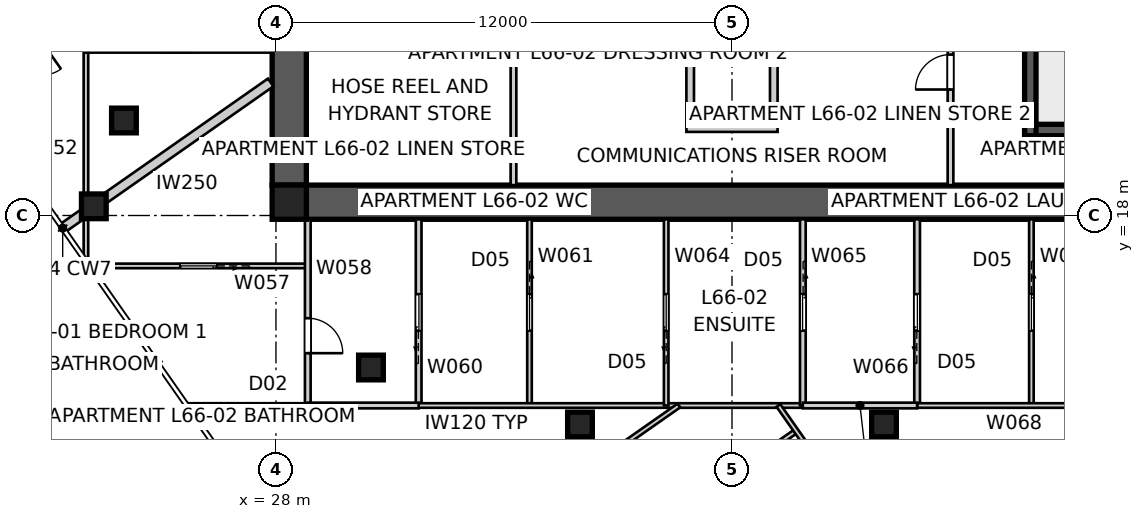
"""IFC4 building model, lengths in metres.
Left out: names, types, materials, properties, quantities, classifications, styles, units other than length and angle.
Written with IfcOpenShell. Run it as: python <this file> out.ifc"""

import sys

from ifc_helpers import new_model, si_unit, direction, frame, frame_2d, origin, origin_2d, place, context, subcontext, project, spatial, polyline, rectangle, outline, extrude, element, fill, save


model = new_model("IFC4")
c1 = context("Model", 3, precision=1e-05, world=origin(), true_north=direction((0.0, 1.0)))
c2 = subcontext(c1, "Body", "Model", "MODEL_VIEW")
j1 = project(units=[si_unit("LENGTHUNIT", "METRE"), si_unit("PLANEANGLEUNIT", "RADIAN")], contexts=[c1])
p1 = place(None, origin())
s1 = spatial("IfcSite", under=j1, at=p1, CompositionType="ELEMENT")
p2 = place(p1, origin())
s2 = spatial("IfcBuilding", under=s1, at=p2, CompositionType="ELEMENT")
p3 = place(p2, frame((0.0, 0.0, 240.4)))
s3 = spatial("IfcBuildingStorey", under=s2, at=p3, CompositionType="ELEMENT", Elevation=240.4)
p4 = place(p3, frame((51.2, 18.35, 0.0), z_axis=(0.0, 0.0, 1.0), x_axis=(-1.0, 0.0, 0.0)))
e1 = element("IfcWall", 1, at=p4, inside=s3, PredefinedType="SHEAR", context=c2, shape_type="SweptSolid", body=[
    extrude(outline(polyline([(0.0, -0.45), (22.4, -0.45), (22.4, -0.025), (22.85, -0.025), (22.85, 0.025), (22.4, 0.025), (22.4, 0.45), (0.0, 0.45), (0.0, 0.025), (-0.45, 0.025), (-0.45, -0.025), (0.0, -0.025), (0.0, -0.45)])), origin(), (0.0, 0.0, 1.0), 3.4),
])
p5 = place(p3, frame((28.35, 41.2, 0.0), z_axis=(0.0, 0.0, 1.0), x_axis=(0.0, -1.0, 0.0)))
e2 = element("IfcWall", 2, at=p5, inside=s3, PredefinedType="SHEAR", context=c2, shape_type="SweptSolid", body=[
    extrude(outline(polyline([(0.0, -0.45), (22.4, -0.45), (22.4, -0.025), (22.85, -0.025), (22.85, 0.025), (22.4, 0.025), (22.4, 0.45), (0.0, 0.45), (0.0, 0.025), (-0.45, 0.025), (-0.45, -0.025), (0.0, -0.025), (0.0, -0.45)])), origin(), (0.0, 0.0, 1.0), 3.4),
])
p6 = place(p5, frame((11.14, 0.0, 0.0)))
e3 = element("IfcOpeningElement", 3, at=p6, cuts=e2, PredefinedType="OPENING", context=c2, shape_type="SweptSolid", body=[
    extrude(rectangle(XDim=1.02, YDim=2.4, at=frame_2d((0.51, 1.2))), frame((0.0, 0.46, 0.0), z_axis=(0.0, -1.0, 0.0), x_axis=(1.0, 0.0, 0.0)), (0.0, 0.0, 1.0), 0.92),
])
p7 = place(p3, frame((47.85, 27.8, 0.0), z_axis=(0.0, 0.0, 1.0), x_axis=(0.0, -1.0, 0.0)))
e4 = element("IfcWall", 4, at=p7, inside=s3, PredefinedType="SHEAR", context=c2, shape_type="SweptSolid", body=[
    extrude(rectangle(XDim=7.7, YDim=0.3, at=frame_2d((3.85, 0.0))), origin(), (0.0, 0.0, 1.0), 3.4),
])
p8 = place(p3, frame((51.2, 20.25, 0.0), z_axis=(0.0, 0.0, 1.0), x_axis=(-1.0, 0.0, 0.0)))
e5 = element("IfcWall", 5, at=p8, inside=s3, PredefinedType="SHEAR", context=c2, shape_type="SweptSolid", body=[
    extrude(rectangle(XDim=3.5, YDim=0.3, at=frame_2d((1.75, 0.0))), origin(), (0.0, 0.0, 1.0), 3.4),
])
for number, where, z_axis, x_axis in (
    (6, (38.9, 22.4, 0.0), (0.0, 0.0, 1.0), (0.0, -1.0, 0.0)),
    (7, (41.1, 22.4, 0.0), (0.0, 0.0, 1.0), (0.0, -1.0, 0.0)),
):
    element("IfcWall", number, at=place(p3, frame(where, z_axis=z_axis, x_axis=x_axis)), inside=s3, PredefinedType="SOLIDWALL", context=c2, shape_type="SweptSolid", body=[
        extrude(rectangle(XDim=2.0, YDim=0.2, at=frame_2d((1.0, 0.0))), origin(), (0.0, 0.0, 1.0), 3.4),
    ])
p9 = place(p3, frame((38.8, 20.3, 0.0), z_axis=(0.0, 0.0, 1.0), x_axis=(1.0, 0.0, 0.0)))
e8 = element("IfcWall", 8, at=p9, inside=s3, PredefinedType="SOLIDWALL", context=c2, shape_type="SweptSolid", body=[
    extrude(rectangle(XDim=2.4, YDim=0.2, at=frame_2d((1.2, 0.0))), origin(), (0.0, 0.0, 1.0), 3.4),
])
p10 = place(p3, frame((28.35, 18.35, 0.0), z_axis=(0.0, 0.0, 1.0), x_axis=(1.0, 0.0, 0.0)))
e9 = element("IfcColumn", 9, at=p10, inside=s3, PredefinedType="COLUMN", context=c2, shape_type="SweptSolid", body=[
    extrude(rectangle(XDim=0.9, YDim=0.9, at=origin_2d()), origin(), (0.0, 0.0, 1.0), 3.4),
])
p11 = place(p3, frame((23.207, 18.242, -0.15), z_axis=(0.0, 0.0, 1.0), x_axis=(1.0, 0.0, 0.0)))
e10 = element("IfcColumn", 10, at=p11, inside=s3, PredefinedType="COLUMN", context=c2, shape_type="SweptSolid", body=[
    extrude(rectangle(XDim=0.65, YDim=0.65, at=origin_2d()), origin(), (0.0, 0.0, 1.0), 3.55),
])
for number, where, z_axis, x_axis in (
    (11, (24.0, 20.5, 0.0), (0.0, 0.0, 1.0), (1.0, 0.0, 0.0)),
    (12, (30.5, 14.0, 0.0), (0.0, 0.0, 1.0), (1.0, 0.0, 0.0)),
    (13, (36.0, 12.5, 0.0), (0.0, 0.0, 1.0), (1.0, 0.0, 0.0)),
    (14, (44.0, 12.5, 0.0), (0.0, 0.0, 1.0), (1.0, 0.0, 0.0)),
):
    element("IfcColumn", number, at=place(p3, frame(where, z_axis=z_axis, x_axis=x_axis)), inside=s3, PredefinedType="COLUMN", context=c2, shape_type="SweptSolid", body=[
        extrude(rectangle(XDim=0.65, YDim=0.65, at=origin_2d()), origin(), (0.0, 0.0, 1.0), 3.4),
    ])
p12 = place(p3, frame((22.388, 17.668, 0.0), z_axis=(0.0, 0.0, 1.0), x_axis=(0.819161528122, 0.573562891796, 0.0)))
e15 = element("IfcWall", 15, at=p12, inside=s3, PredefinedType="PARTITIONING", context=c2, shape_type="SweptSolid", body=[
    extrude(rectangle(XDim=6.681, YDim=0.25, at=frame_2d((3.341, 0.0))), origin(), (0.0, 0.0, 1.0), 3.25),
])
p13 = place(p3, frame((45.75, 18.8, 0.0), z_axis=(0.0, 0.0, 1.0), x_axis=(0.0, 1.0, 0.0)))
e16 = element("IfcWall", 16, at=p13, inside=s3, PredefinedType="SOLIDWALL", context=c2, shape_type="SweptSolid", body=[
    extrude(rectangle(XDim=5.95, YDim=0.15, at=frame_2d((2.975, 0.0))), origin(), (0.0, 0.0, 1.0), 3.25),
])
p14 = place(p13, frame((2.515, 0.0, 0.0)))
e17 = element("IfcOpeningElement", 17, at=p14, cuts=e16, PredefinedType="OPENING", context=c2, shape_type="SweptSolid", body=[
    extrude(rectangle(XDim=0.92, YDim=2.1, at=frame_2d((0.46, 1.05))), frame((0.0, 0.085, 0.0), z_axis=(0.0, -1.0, 0.0), x_axis=(1.0, 0.0, 0.0)), (0.0, 0.0, 1.0), 0.17),
])
p15 = place(p3, frame((34.25, 18.8, 0.0), z_axis=(0.0, 0.0, 1.0), x_axis=(0.0, 1.0, 0.0)))
e18 = element("IfcWall", 18, at=p15, inside=s3, PredefinedType="SOLIDWALL", context=c2, shape_type="SweptSolid", body=[
    extrude(rectangle(XDim=5.9, YDim=0.15, at=frame_2d((2.95, 0.0))), origin(), (0.0, 0.0, 1.0), 3.25),
])
p16 = place(p3, frame((23.0, 16.864, 0.0), z_axis=(0.0, 0.0, 1.0), x_axis=(0.0, 1.0, 0.0)))
e19 = element("IfcWall", 19, at=p16, inside=s3, PredefinedType="PARTITIONING", context=c2, shape_type="SweptSolid", body=[
    extrude(rectangle(XDim=19.28, YDim=0.12, at=frame_2d((9.64, 0.0))), origin(), (0.0, 0.0, 1.0), 2.55),
])
p17 = place(p16, frame((9.599, 0.0, 0.0)))
e20 = element("IfcOpeningElement", 20, at=p17, cuts=e19, PredefinedType="OPENING", context=c2, shape_type="SweptSolid", body=[
    extrude(rectangle(XDim=0.92, YDim=2.34, at=frame_2d((0.46, 1.17))), frame((0.0, 0.07, 0.0), z_axis=(0.0, -1.0, 0.0), x_axis=(1.0, 0.0, 0.0)), (0.0, 0.0, 1.0), 0.14),
])
p18 = place(p16, frame((17.603, 0.0, 0.0)))
e21 = element("IfcOpeningElement", 21, at=p18, cuts=e19, PredefinedType="OPENING", context=c2, shape_type="SweptSolid", body=[
    extrude(rectangle(XDim=0.92, YDim=2.34, at=frame_2d((0.46, 1.17))), frame((0.0, 0.07, 0.0), z_axis=(0.0, -1.0, 0.0), x_axis=(1.0, 0.0, 0.0)), (0.0, 0.0, 1.0), 0.14),
])
p19 = place(p16, frame((12.806, 0.0, 0.0)))
e22 = element("IfcOpeningElement", 22, at=p19, cuts=e19, PredefinedType="OPENING", context=c2, shape_type="SweptSolid", body=[
    extrude(rectangle(XDim=0.92, YDim=2.34, at=frame_2d((0.46, 1.17))), frame((0.0, 0.07, 0.0), z_axis=(0.0, -1.0, 0.0), x_axis=(1.0, 0.0, 0.0)), (0.0, 0.0, 1.0), 0.14),
])
p20 = place(p3, frame((23.0, 22.347, 0.0), z_axis=(0.0, 0.0, 1.0), x_axis=(1.0, 0.0, 0.0)))
e23 = element("IfcWall", 23, at=p20, inside=s3, PredefinedType="PARTITIONING", context=c2, shape_type="SweptSolid", body=[
    extrude(rectangle(XDim=4.9, YDim=0.12, at=frame_2d((2.45, 0.0))), origin(), (0.0, 0.0, 1.0), 3.25),
])
p21 = place(p20, frame((1.97, 0.0, 0.0)))
e24 = element("IfcOpeningElement", 24, at=p21, cuts=e23, PredefinedType="OPENING", context=c2, shape_type="SweptSolid", body=[
    extrude(rectangle(XDim=0.96, YDim=2.1, at=frame_2d((0.48, 1.05))), frame((0.0, 0.07, 0.0), z_axis=(0.0, -1.0, 0.0), x_axis=(1.0, 0.0, 0.0)), (0.0, 0.0, 1.0), 0.14),
])
p22 = place(p3, frame((23.0, 23.438, 0.0), z_axis=(0.0, 0.0, 1.0), x_axis=(-0.819140645834, -0.573592714688, 0.0)))
e25 = element("IfcWall", 25, at=p22, inside=s3, PredefinedType="PARTITIONING", context=c2, shape_type="SweptSolid", body=[
    extrude(rectangle(XDim=3.77, YDim=0.12, at=frame_2d((1.885, 0.0))), origin(), (0.0, 0.0, 1.0), 3.25),
])
p23 = place(p22, frame((1.445, 0.0, 0.0)))
e26 = element("IfcOpeningElement", 26, at=p23, cuts=e25, PredefinedType="OPENING", context=c2, shape_type="SweptSolid", body=[
    extrude(rectangle(XDim=0.92, YDim=2.34, at=frame_2d((0.46, 1.17))), frame((0.0, 0.07, 0.0), z_axis=(0.0, -1.0, 0.0), x_axis=(1.0, 0.0, 0.0)), (0.0, 0.0, 1.0), 0.14),
])
p24 = place(p3, frame((28.837, 16.673, 0.0), z_axis=(0.0, 0.0, 1.0), x_axis=(-1.0, 0.0, 0.0)))
e27 = element("IfcWall", 27, at=p24, inside=s3, PredefinedType="PARTITIONING", context=c2, shape_type="SweptSolid", body=[
    extrude(rectangle(XDim=5.704, YDim=0.12, at=frame_2d((2.852, 0.0))), origin(), (0.0, 0.0, 1.0), 3.25),
])
p25 = place(p24, frame((2.396, 0.0, 0.0)))
e28 = element("IfcOpeningElement", 28, at=p25, cuts=e27, PredefinedType="OPENING", context=c2, shape_type="SweptSolid", body=[
    extrude(rectangle(XDim=0.96, YDim=2.1, at=frame_2d((0.48, 1.05))), frame((0.0, 0.07, 0.0), z_axis=(0.0, -1.0, 0.0), x_axis=(1.0, 0.0, 0.0)), (0.0, 0.0, 1.0), 0.14),
])
p26 = place(p3, frame((28.837, 17.9, 0.0), z_axis=(0.0, 0.0, 1.0), x_axis=(0.0, -1.0, 0.0)))
e29 = element("IfcWall", 29, at=p26, inside=s3, PredefinedType="SOLIDWALL", context=c2, shape_type="SweptSolid", body=[
    extrude(rectangle(XDim=4.9, YDim=0.15, at=frame_2d((2.45, 0.0))), origin(), (0.0, 0.0, 1.0), 3.25),
])
p27 = place(p26, frame((2.603, 0.0, 0.0)))
e30 = element("IfcOpeningElement", 30, at=p27, cuts=e29, PredefinedType="OPENING", context=c2, shape_type="SweptSolid", body=[
    extrude(rectangle(XDim=0.92, YDim=2.34, at=frame_2d((0.46, 1.17))), frame((0.0, 0.085, 0.0), z_axis=(0.0, -1.0, 0.0), x_axis=(1.0, 0.0, 0.0)), (0.0, 0.0, 1.0), 0.17),
])
p28 = place(p3, frame((28.837, 13.0, 0.0), z_axis=(0.0, 0.0, 1.0), x_axis=(-1.0, 0.0, 0.0)))
e31 = element("IfcWall", 31, at=p28, inside=s3, PredefinedType="PARTITIONING", context=c2, shape_type="SweptSolid", body=[
    extrude(rectangle(XDim=3.132, YDim=0.12, at=frame_2d((1.566, 0.0))), origin(), (0.0, 0.0, 1.0), 3.25),
])
p29 = place(p3, frame((31.755, 13.0, 0.0), z_axis=(0.0, 0.0, 1.0), x_axis=(0.0, 1.0, 0.0)))
e32 = element("IfcWall", 32, at=p29, inside=s3, PredefinedType="SOLIDWALL", context=c2, shape_type="SweptSolid", body=[
    extrude(rectangle(XDim=4.9, YDim=0.15, at=frame_2d((2.45, 0.0))), origin(), (0.0, 0.0, 1.0), 3.25),
])
p30 = place(p29, frame((1.97, 0.0, 0.0)))
e33 = element("IfcOpeningElement", 33, at=p30, cuts=e32, PredefinedType="OPENING", context=c2, shape_type="SweptSolid", body=[
    extrude(rectangle(XDim=0.96, YDim=2.1, at=frame_2d((0.48, 1.05))), frame((0.0, 0.085, 0.0), z_axis=(0.0, -1.0, 0.0), x_axis=(1.0, 0.0, 0.0)), (0.0, 0.0, 1.0), 0.17),
])
p31 = place(p3, frame((34.672, 17.9, 0.0), z_axis=(0.0, 0.0, 1.0), x_axis=(0.0, -1.0, 0.0)))
e34 = element("IfcWall", 34, at=p31, inside=s3, PredefinedType="PARTITIONING", context=c2, shape_type="SweptSolid", body=[
    extrude(rectangle(XDim=4.9, YDim=0.12, at=frame_2d((2.45, 0.0))), origin(), (0.0, 0.0, 1.0), 3.25),
])
p32 = place(p31, frame((1.97, 0.0, 0.0)))
e35 = element("IfcOpeningElement", 35, at=p32, cuts=e34, PredefinedType="OPENING", context=c2, shape_type="SweptSolid", body=[
    extrude(rectangle(XDim=0.96, YDim=2.1, at=frame_2d((0.48, 1.05))), frame((0.0, 0.07, 0.0), z_axis=(0.0, -1.0, 0.0), x_axis=(1.0, 0.0, 0.0)), (0.0, 0.0, 1.0), 0.14),
])
p33 = place(p3, frame((41.865, 13.0, 0.0), z_axis=(0.0, 0.0, 1.0), x_axis=(-1.0, 0.0, 0.0)))
e36 = element("IfcWall", 36, at=p33, inside=s3, PredefinedType="PARTITIONING", context=c2, shape_type="SweptSolid", body=[
    extrude(rectangle(XDim=10.11, YDim=0.12, at=frame_2d((5.055, 0.0))), origin(), (0.0, 0.0, 1.0), 2.55),
])
p34 = place(p3, frame((31.755, 13.0, 0.0), z_axis=(0.0, 0.0, 1.0), x_axis=(-1.0, 0.0, 0.0)))
e37 = element("IfcWall", 37, at=p34, inside=s3, PredefinedType="SOLIDWALL", context=c2, shape_type="SweptSolid", body=[
    extrude(rectangle(XDim=2.917, YDim=0.15, at=frame_2d((1.458, 0.0))), origin(), (0.0, 0.0, 1.0), 3.25),
])
p35 = place(p3, frame((38.268, 13.0, 0.0), z_axis=(0.0, 0.0, 1.0), x_axis=(0.0, 1.0, 0.0)))
e38 = element("IfcWall", 38, at=p35, inside=s3, PredefinedType="PARTITIONING", context=c2, shape_type="SweptSolid", body=[
    extrude(rectangle(XDim=4.9, YDim=0.12, at=frame_2d((2.45, 0.0))), origin(), (0.0, 0.0, 1.0), 3.25),
])
p36 = place(p35, frame((1.97, 0.0, 0.0)))
e39 = element("IfcOpeningElement", 39, at=p36, cuts=e38, PredefinedType="OPENING", context=c2, shape_type="SweptSolid", body=[
    extrude(rectangle(XDim=0.96, YDim=2.1, at=frame_2d((0.48, 1.05))), frame((0.0, 0.07, 0.0), z_axis=(0.0, -1.0, 0.0), x_axis=(1.0, 0.0, 0.0)), (0.0, 0.0, 1.0), 0.14),
])
p37 = place(p3, frame((41.865, 17.9, 0.0), z_axis=(0.0, 0.0, 1.0), x_axis=(0.0, -1.0, 0.0)))
e40 = element("IfcWall", 40, at=p37, inside=s3, PredefinedType="SOLIDWALL", context=c2, shape_type="SweptSolid", body=[
    extrude(rectangle(XDim=4.9, YDim=0.15, at=frame_2d((2.45, 0.0))), origin(), (0.0, 0.0, 1.0), 3.25),
])
p38 = place(p37, frame((1.97, 0.0, 0.0)))
e41 = element("IfcOpeningElement", 41, at=p38, cuts=e40, PredefinedType="OPENING", context=c2, shape_type="SweptSolid", body=[
    extrude(rectangle(XDim=0.96, YDim=2.1, at=frame_2d((0.48, 1.05))), frame((0.0, 0.085, 0.0), z_axis=(0.0, -1.0, 0.0), x_axis=(1.0, 0.0, 0.0)), (0.0, 0.0, 1.0), 0.17),
])
p39 = place(p3, frame((44.871, 13.0, 0.0), z_axis=(0.0, 0.0, 1.0), x_axis=(0.0, 1.0, 0.0)))
e42 = element("IfcWall", 42, at=p39, inside=s3, PredefinedType="SOLIDWALL", context=c2, shape_type="SweptSolid", body=[
    extrude(rectangle(XDim=4.9, YDim=0.15, at=frame_2d((2.45, 0.0))), origin(), (0.0, 0.0, 1.0), 3.25),
])
p40 = place(p39, frame((1.97, 0.0, 0.0)))
e43 = element("IfcOpeningElement", 43, at=p40, cuts=e42, PredefinedType="OPENING", context=c2, shape_type="SweptSolid", body=[
    extrude(rectangle(XDim=0.96, YDim=2.1, at=frame_2d((0.48, 1.05))), frame((0.0, 0.085, 0.0), z_axis=(0.0, -1.0, 0.0), x_axis=(1.0, 0.0, 0.0)), (0.0, 0.0, 1.0), 0.17),
])
p41 = place(p3, frame((47.878, 17.9, 0.0), z_axis=(0.0, 0.0, 1.0), x_axis=(0.0, -1.0, 0.0)))
e44 = element("IfcWall", 44, at=p41, inside=s3, PredefinedType="PARTITIONING", context=c2, shape_type="SweptSolid", body=[
    extrude(rectangle(XDim=4.9, YDim=0.12, at=frame_2d((2.45, 0.0))), origin(), (0.0, 0.0, 1.0), 3.25),
])
p42 = place(p41, frame((1.97, 0.0, 0.0)))
e45 = element("IfcOpeningElement", 45, at=p42, cuts=e44, PredefinedType="OPENING", context=c2, shape_type="SweptSolid", body=[
    extrude(rectangle(XDim=0.96, YDim=2.1, at=frame_2d((0.48, 1.05))), frame((0.0, 0.07, 0.0), z_axis=(0.0, -1.0, 0.0), x_axis=(1.0, 0.0, 0.0)), (0.0, 0.0, 1.0), 0.14),
])
p43 = place(p3, frame((52.109, 13.0, 0.0), z_axis=(0.0, 0.0, 1.0), x_axis=(-1.0, 0.0, 0.0)))
e46 = element("IfcWall", 46, at=p43, inside=s3, PredefinedType="PARTITIONING", context=c2, shape_type="SweptSolid", body=[
    extrude(rectangle(XDim=7.238, YDim=0.12, at=frame_2d((3.619, 0.0))), origin(), (0.0, 0.0, 1.0), 2.55),
])
p44 = place(p43, frame((1.205, 0.0, 0.0)))
e47 = element("IfcOpeningElement", 47, at=p44, cuts=e46, PredefinedType="OPENING", context=c2, shape_type="SweptSolid", body=[
    extrude(rectangle(XDim=0.92, YDim=2.34, at=frame_2d((0.46, 1.17))), frame((0.0, 0.07, 0.0), z_axis=(0.0, -1.0, 0.0), x_axis=(1.0, 0.0, 0.0)), (0.0, 0.0, 1.0), 0.14),
])
p45 = place(p3, frame((44.871, 13.0, 0.0), z_axis=(0.0, 0.0, 1.0), x_axis=(-1.0, 0.0, 0.0)))
e48 = element("IfcWall", 48, at=p45, inside=s3, PredefinedType="SOLIDWALL", context=c2, shape_type="SweptSolid", body=[
    extrude(rectangle(XDim=3.007, YDim=0.15, at=frame_2d((1.503, 0.0))), origin(), (0.0, 0.0, 1.0), 3.25),
])
p46 = place(p3, frame((31.279, 5.04, 0.0), z_axis=(0.0, 0.0, 1.0), x_axis=(0.819155207289, 0.573571919092, 0.0)))
e49 = element("IfcWall", 49, at=p46, inside=s3, PredefinedType="PARTITIONING", context=c2, shape_type="SweptSolid", body=[
    extrude(rectangle(XDim=12.71, YDim=0.12, at=frame_2d((6.355, 0.0))), origin(), (0.0, 0.0, 1.0), 2.717),
])
p47 = place(p46, frame((5.875, 0.0, 0.0)))
e50 = element("IfcOpeningElement", 50, at=p47, cuts=e49, PredefinedType="OPENING", context=c2, shape_type="SweptSolid", body=[
    extrude(rectangle(XDim=0.92, YDim=2.34, at=frame_2d((0.46, 1.17))), frame((0.0, 0.07, 0.0), z_axis=(0.0, -1.0, 0.0), x_axis=(1.0, 0.0, 0.0)), (0.0, 0.0, 1.0), 0.14),
])
p48 = place(p3, frame((41.222, 13.0, 0.0), z_axis=(0.0, 0.0, 1.0), x_axis=(0.57357503053, -0.819153028653, 0.0)))
e51 = element("IfcWall", 51, at=p48, inside=s3, PredefinedType="PARTITIONING", context=c2, shape_type="SweptSolid", body=[
    extrude(rectangle(XDim=6.834, YDim=0.12, at=frame_2d((3.417, 0.0))), origin(), (0.0, 0.0, 1.0), 3.25),
])
p49 = place(p48, frame((3.386, 0.0, 0.0)))
e52 = element("IfcOpeningElement", 52, at=p49, cuts=e51, PredefinedType="OPENING", context=c2, shape_type="SweptSolid", body=[
    extrude(rectangle(XDim=0.92, YDim=2.34, at=frame_2d((0.46, 1.17))), frame((0.0, 0.07, 0.0), z_axis=(0.0, -1.0, 0.0), x_axis=(1.0, 0.0, 0.0)), (0.0, 0.0, 1.0), 0.14),
])
p50 = place(p3, frame((38.604, 13.0, 0.0), z_axis=(0.0, 0.0, 1.0), x_axis=(-0.819123352089, -0.573617410878, 0.0)))
e53 = element("IfcWall", 53, at=p50, inside=s3, PredefinedType="PARTITIONING", context=c2, shape_type="SweptSolid", body=[
    extrude(rectangle(XDim=10.566, YDim=0.12, at=frame_2d((5.283, 0.0))), origin(), (0.0, 0.0, 1.0), 3.25),
])
p51 = place(p50, frame((4.831, 0.0, 0.0)))
e54 = element("IfcOpeningElement", 54, at=p51, cuts=e53, PredefinedType="OPENING", context=c2, shape_type="SweptSolid", body=[
    extrude(rectangle(XDim=0.92, YDim=2.34, at=frame_2d((0.46, 1.17))), frame((0.0, 0.07, 0.0), z_axis=(0.0, -1.0, 0.0), x_axis=(1.0, 0.0, 0.0)), (0.0, 0.0, 1.0), 0.14),
])
p52 = place(p14, origin())
e55 = element("IfcDoor", 55, at=p52, inside=s3, OperationType="SINGLE_SWING_LEFT", PredefinedType="DOOR", context=c2, shape_type="SweptSolid", body=[
    extrude(rectangle(XDim=0.92, YDim=2.1, at=frame_2d((0.46, 1.05))), frame((0.0, 0.025, 0.0), z_axis=(0.0, -1.0, 0.0), x_axis=(1.0, 0.0, 0.0)), (0.0, 0.0, 1.0), 0.05),
])
fill(e17, e55)
p53 = place(p42, origin())
e56 = element("IfcDoor", 56, at=p53, inside=s3, OperationType="SLIDING_TO_LEFT", PredefinedType="DOOR", context=c2, shape_type="SweptSolid", body=[
    extrude(rectangle(XDim=0.96, YDim=2.1, at=frame_2d((0.48, 1.05))), frame((0.0, 0.025, 0.0), z_axis=(0.0, -1.0, 0.0), x_axis=(1.0, 0.0, 0.0)), (0.0, 0.0, 1.0), 0.05),
])
fill(e45, e56)
p54 = place(p40, origin())
e57 = element("IfcDoor", 57, at=p54, inside=s3, OperationType="SLIDING_TO_LEFT", PredefinedType="DOOR", context=c2, shape_type="SweptSolid", body=[
    extrude(rectangle(XDim=0.96, YDim=2.1, at=frame_2d((0.48, 1.05))), frame((0.0, 0.025, 0.0), z_axis=(0.0, -1.0, 0.0), x_axis=(1.0, 0.0, 0.0)), (0.0, 0.0, 1.0), 0.05),
])
fill(e43, e57)
p55 = place(p38, origin())
e58 = element("IfcDoor", 58, at=p55, inside=s3, OperationType="SLIDING_TO_LEFT", PredefinedType="DOOR", context=c2, shape_type="SweptSolid", body=[
    extrude(rectangle(XDim=0.96, YDim=2.1, at=frame_2d((0.48, 1.05))), frame((0.0, 0.025, 0.0), z_axis=(0.0, -1.0, 0.0), x_axis=(1.0, 0.0, 0.0)), (0.0, 0.0, 1.0), 0.05),
])
fill(e41, e58)
p56 = place(p36, origin())
e59 = element("IfcDoor", 59, at=p56, inside=s3, OperationType="SLIDING_TO_LEFT", PredefinedType="DOOR", context=c2, shape_type="SweptSolid", body=[
    extrude(rectangle(XDim=0.96, YDim=2.1, at=frame_2d((0.48, 1.05))), frame((0.0, 0.025, 0.0), z_axis=(0.0, -1.0, 0.0), x_axis=(1.0, 0.0, 0.0)), (0.0, 0.0, 1.0), 0.05),
])
fill(e39, e59)
p57 = place(p32, origin())
e60 = element("IfcDoor", 60, at=p57, inside=s3, OperationType="SLIDING_TO_LEFT", PredefinedType="DOOR", context=c2, shape_type="SweptSolid", body=[
    extrude(rectangle(XDim=0.96, YDim=2.1, at=frame_2d((0.48, 1.05))), frame((0.0, 0.025, 0.0), z_axis=(0.0, -1.0, 0.0), x_axis=(1.0, 0.0, 0.0)), (0.0, 0.0, 1.0), 0.05),
])
fill(e35, e60)
p58 = place(p30, origin())
e61 = element("IfcDoor", 61, at=p58, inside=s3, OperationType="SLIDING_TO_LEFT", PredefinedType="DOOR", context=c2, shape_type="SweptSolid", body=[
    extrude(rectangle(XDim=0.96, YDim=2.1, at=frame_2d((0.48, 1.05))), frame((0.0, 0.025, 0.0), z_axis=(0.0, -1.0, 0.0), x_axis=(1.0, 0.0, 0.0)), (0.0, 0.0, 1.0), 0.05),
])
fill(e33, e61)
p59 = place(p27, origin())
e62 = element("IfcDoor", 62, at=p59, inside=s3, OperationType="SINGLE_SWING_RIGHT", PredefinedType="DOOR", context=c2, shape_type="SweptSolid", body=[
    extrude(rectangle(XDim=0.92, YDim=2.34, at=frame_2d((0.46, 1.17))), frame((0.0, 0.025, 0.0), z_axis=(0.0, -1.0, 0.0), x_axis=(1.0, 0.0, 0.0)), (0.0, 0.0, 1.0), 0.05),
])
fill(e30, e62)
p60 = place(p25, origin())
e63 = element("IfcDoor", 63, at=p60, inside=s3, OperationType="SLIDING_TO_LEFT", PredefinedType="DOOR", context=c2, shape_type="SweptSolid", body=[
    extrude(rectangle(XDim=0.96, YDim=2.1, at=frame_2d((0.48, 1.05))), frame((0.0, 0.025, 0.0), z_axis=(0.0, -1.0, 0.0), x_axis=(1.0, 0.0, 0.0)), (0.0, 0.0, 1.0), 0.05),
])
fill(e28, e63)
save(model, sys.argv[1])
